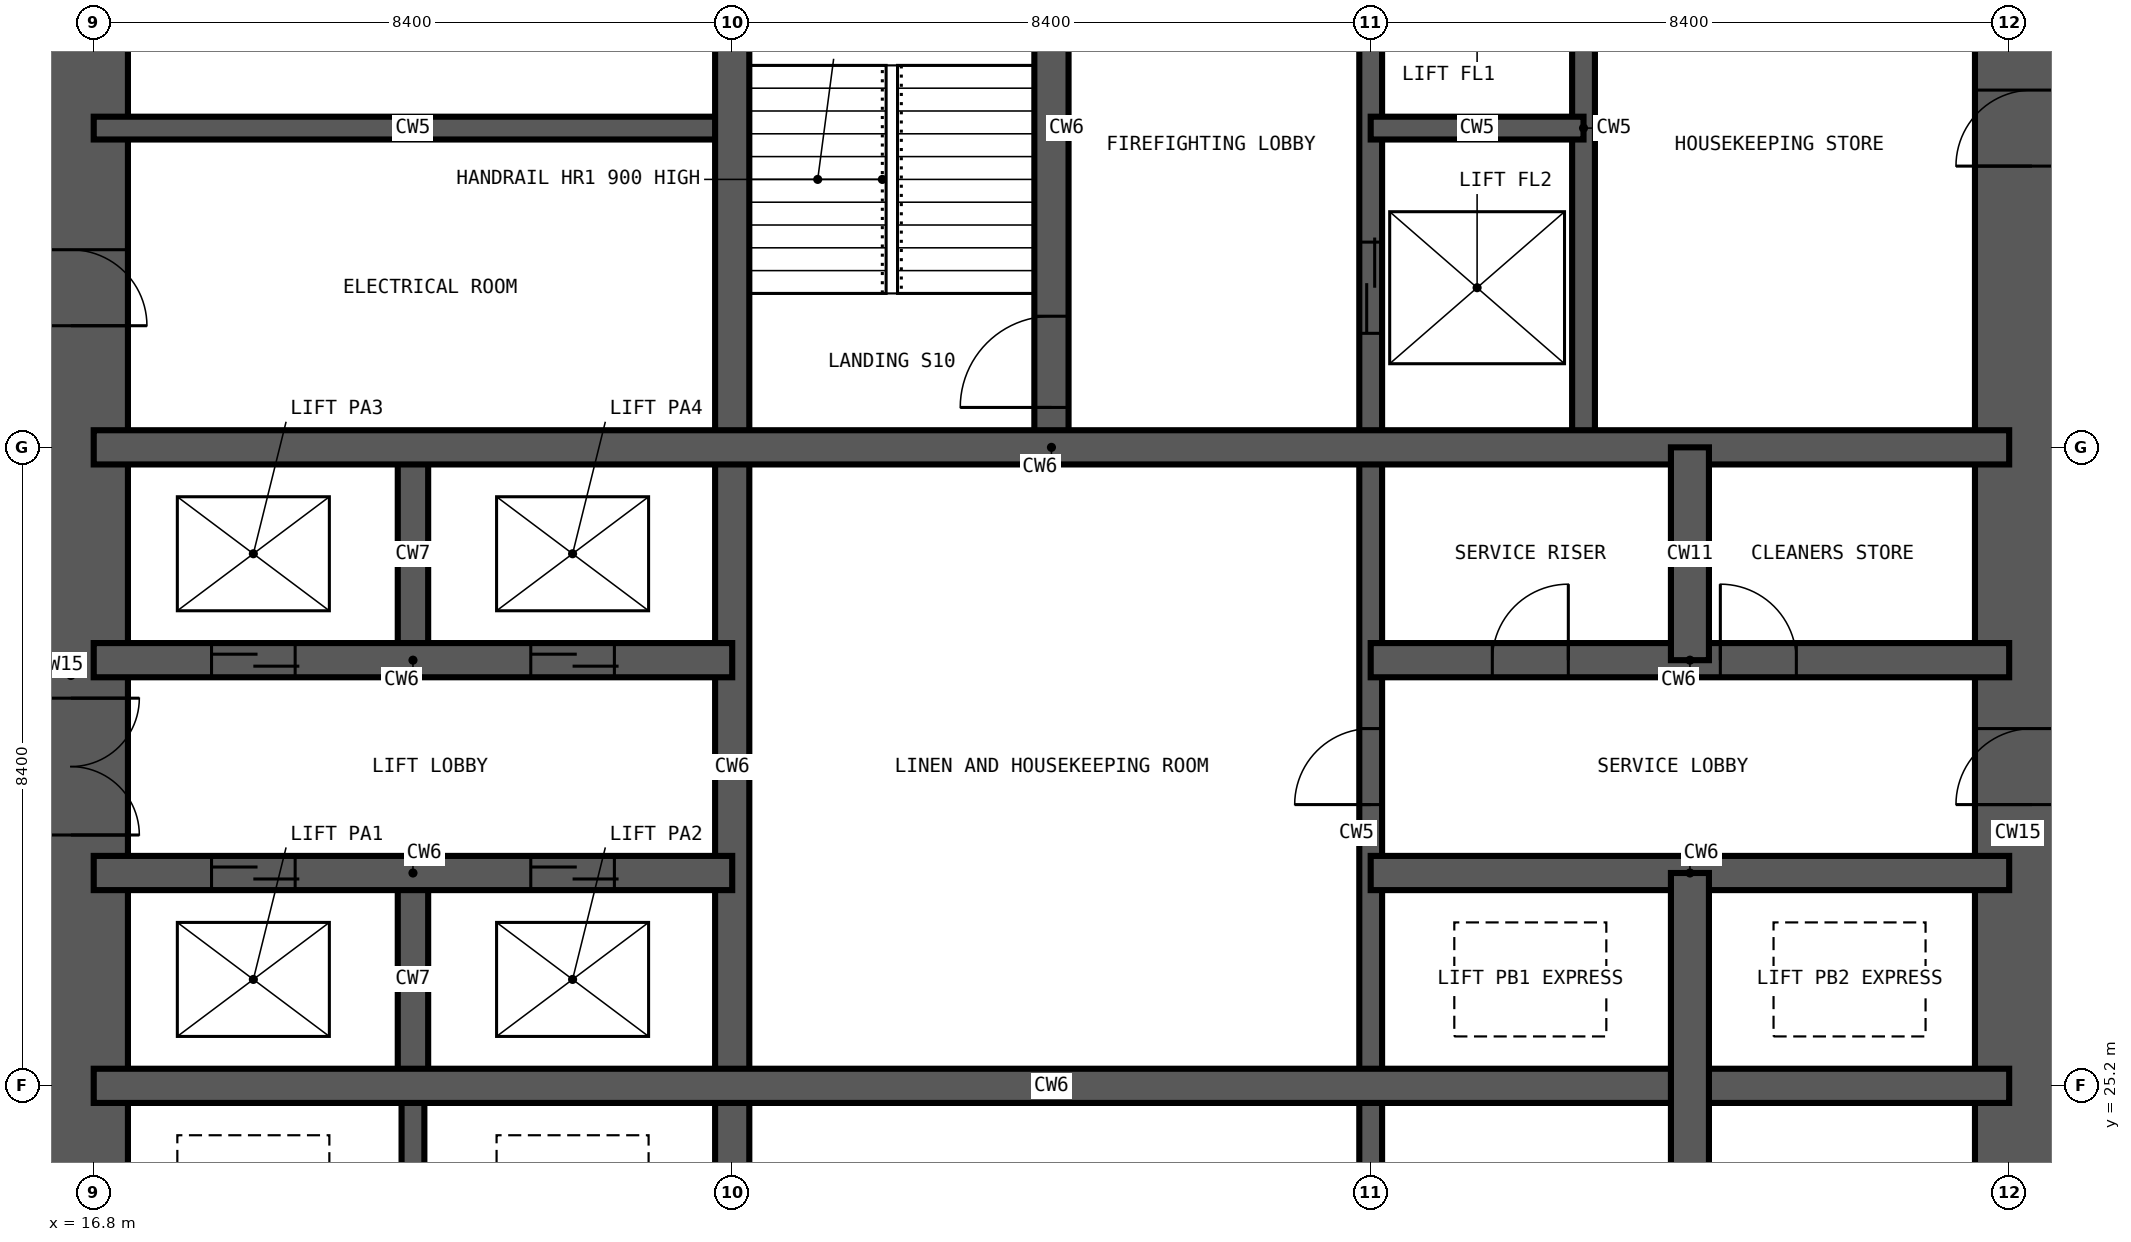
"""IFC4 building model, lengths in metres.
Left out: names, types, materials, properties, quantities, classifications, styles, units other than length and angle.
Written with IfcOpenShell. Run it as: python <this file> out.ifc"""

import sys

from ifc_helpers import new_model, si_unit, direction, frame, frame_2d, origin, place, context, subcontext, project, spatial, rectangle, extrude, element, fill, save


model = new_model("IFC4")
c1 = context("Model", 3, precision=1e-05, world=origin(), true_north=direction((0.0, 1.0)))
c2 = subcontext(c1, "Body", "Model", "MODEL_VIEW")
j1 = project(units=[si_unit("LENGTHUNIT", "METRE"), si_unit("PLANEANGLEUNIT", "RADIAN")], contexts=[c1])
p1 = place(None, origin())
s1 = spatial("IfcSite", under=j1, at=p1, CompositionType="ELEMENT")
p2 = place(p1, origin())
s2 = spatial("IfcBuilding", under=s1, at=p2, CompositionType="ELEMENT")
p3 = place(p2, frame((0.0, 0.0, 52.2)))
s3 = spatial("IfcBuildingStorey", under=s2, at=p3, CompositionType="ELEMENT", Elevation=52.2)
p4 = place(p3, frame((42.3, 17.25, -0.35), z_axis=(0.0, 0.0, 1.0), x_axis=(0.0, 1.0, 0.0)))
e1 = element("IfcWall", 1, at=p4, inside=s3, PredefinedType="SHEAR", context=c2, shape_type="SweptSolid", body=[
    extrude(rectangle(XDim=24.3, YDim=1.5, at=frame_2d((12.15, 0.0))), origin(), (0.0, 0.0, 1.0), 3.6),
])
p5 = place(p4, frame((0.35, 0.0, 0.35)))
e2 = element("IfcOpeningElement", 2, at=p5, cuts=e1, PredefinedType="OPENING", context=c2, shape_type="SweptSolid", body=[
    extrude(rectangle(XDim=1.2, YDim=2.2, at=frame_2d((0.6, 1.1))), frame((0.0, 0.76, 0.0), z_axis=(0.0, -1.0, 0.0), x_axis=(1.0, 0.0, 0.0)), (0.0, 0.0, 1.0), 1.52),
])
p6 = place(p4, frame((11.65, 0.0, 0.35)))
e3 = element("IfcOpeningElement", 3, at=p6, cuts=e1, PredefinedType="OPENING", context=c2, shape_type="SweptSolid", body=[
    extrude(rectangle(XDim=1.0, YDim=2.1, at=frame_2d((0.5, 1.05))), frame((0.0, 0.76, 0.0), z_axis=(0.0, -1.0, 0.0), x_axis=(1.0, 0.0, 0.0)), (0.0, 0.0, 1.0), 1.52),
])
p7 = place(p4, frame((20.05, 0.0, 0.35)))
e4 = element("IfcOpeningElement", 4, at=p7, cuts=e1, PredefinedType="OPENING", context=c2, shape_type="SweptSolid", body=[
    extrude(rectangle(XDim=1.0, YDim=2.1, at=frame_2d((0.5, 1.05))), frame((0.0, 0.76, 0.0), z_axis=(0.0, -1.0, 0.0), x_axis=(1.0, 0.0, 0.0)), (0.0, 0.0, 1.0), 1.52),
])
p8 = place(p3, frame((16.5, 41.55, -0.35), z_axis=(0.0, 0.0, 1.0), x_axis=(0.0, -1.0, 0.0)))
e5 = element("IfcWall", 5, at=p8, inside=s3, PredefinedType="SHEAR", context=c2, shape_type="SweptSolid", body=[
    extrude(rectangle(XDim=24.3, YDim=1.5, at=frame_2d((12.15, 0.0))), origin(), (0.0, 0.0, 1.0), 3.6),
])
p9 = place(p8, frame((11.25, 0.0, 0.35)))
e6 = element("IfcOpeningElement", 6, at=p9, cuts=e5, PredefinedType="OPENING", context=c2, shape_type="SweptSolid", body=[
    extrude(rectangle(XDim=1.8, YDim=2.2, at=frame_2d((0.9, 1.1))), frame((0.0, 0.76, 0.0), z_axis=(0.0, -1.0, 0.0), x_axis=(1.0, 0.0, 0.0)), (0.0, 0.0, 1.0), 1.52),
])
p10 = place(p8, frame((20.05, 0.0, 0.35)))
e7 = element("IfcOpeningElement", 7, at=p10, cuts=e5, PredefinedType="OPENING", context=c2, shape_type="SweptSolid", body=[
    extrude(rectangle(XDim=1.0, YDim=2.1, at=frame_2d((0.5, 1.05))), frame((0.0, 0.76, 0.0), z_axis=(0.0, -1.0, 0.0), x_axis=(1.0, 0.0, 0.0)), (0.0, 0.0, 1.0), 1.52),
])
p11 = place(p8, frame((5.35, 0.0, 0.35)))
e8 = element("IfcOpeningElement", 8, at=p11, cuts=e5, PredefinedType="OPENING", context=c2, shape_type="SweptSolid", body=[
    extrude(rectangle(XDim=1.0, YDim=2.1, at=frame_2d((0.5, 1.05))), frame((0.0, 0.76, 0.0), z_axis=(0.0, -1.0, 0.0), x_axis=(1.0, 0.0, 0.0)), (0.0, 0.0, 1.0), 1.52),
])
p12 = place(p3, frame((21.0, 22.4, -0.35), z_axis=(0.0, 0.0, 1.0), x_axis=(0.0, 1.0, 0.0)))
e9 = element("IfcWall", 9, at=p12, inside=s3, PredefinedType="SHEAR", context=c2, shape_type="SweptSolid", body=[
    extrude(rectangle(XDim=2.8, YDim=0.3, at=frame_2d((1.4, 0.0))), origin(), (0.0, 0.0, 1.0), 3.6),
])
p13 = place(p3, frame((33.6, 16.8, -0.35), z_axis=(0.0, 0.0, 1.0), x_axis=(0.0, 1.0, 0.0)))
e10 = element("IfcWall", 10, at=p13, inside=s3, PredefinedType="SHEAR", context=c2, shape_type="SweptSolid", body=[
    extrude(rectangle(XDim=25.2, YDim=0.3, at=frame_2d((12.6, 0.0))), origin(), (0.0, 0.0, 1.0), 3.6),
])
p14 = place(p13, frame((22.5, 0.0, 0.35)))
e11 = element("IfcOpeningElement", 11, at=p14, cuts=e10, PredefinedType="OPENING", context=c2, shape_type="SweptSolid", body=[
    extrude(rectangle(XDim=1.2, YDim=2.2, at=frame_2d((0.6, 1.1))), frame((0.0, 0.16, 0.0), z_axis=(0.0, -1.0, 0.0), x_axis=(1.0, 0.0, 0.0)), (0.0, 0.0, 1.0), 0.32),
])
p15 = place(p13, frame((18.3, 0.0, 0.35)))
e12 = element("IfcOpeningElement", 12, at=p15, cuts=e10, PredefinedType="OPENING", context=c2, shape_type="SweptSolid", body=[
    extrude(rectangle(XDim=1.2, YDim=2.2, at=frame_2d((0.6, 1.1))), frame((0.0, 0.16, 0.0), z_axis=(0.0, -1.0, 0.0), x_axis=(1.0, 0.0, 0.0)), (0.0, 0.0, 1.0), 0.32),
])
p16 = place(p13, frame((12.1, 0.0, 0.35)))
e13 = element("IfcOpeningElement", 13, at=p16, cuts=e10, PredefinedType="OPENING", context=c2, shape_type="SweptSolid", body=[
    extrude(rectangle(XDim=1.0, YDim=2.1, at=frame_2d((0.5, 1.05))), frame((0.0, 0.16, 0.0), z_axis=(0.0, -1.0, 0.0), x_axis=(1.0, 0.0, 0.0)), (0.0, 0.0, 1.0), 0.32),
])
for number, where, z_axis, x_axis in (
    (14, (36.4, 33.6, -0.35), (0.0, 0.0, 1.0), (0.0, 1.0, 0.0)),
    (15, (16.8, 37.8, -0.35), (0.0, 0.0, 1.0), (1.0, 0.0, 0.0)),
):
    element("IfcWall", number, at=place(p3, frame(where, z_axis=z_axis, x_axis=x_axis)), inside=s3, PredefinedType="SHEAR", context=c2, shape_type="SweptSolid", body=[
        extrude(rectangle(XDim=8.4, YDim=0.3, at=frame_2d((4.2, 0.0))), origin(), (0.0, 0.0, 1.0), 3.6),
    ])
p17 = place(p3, frame((33.6, 37.8, -0.35), z_axis=(0.0, 0.0, 1.0), x_axis=(1.0, 0.0, 0.0)))
e16 = element("IfcWall", 16, at=p17, inside=s3, PredefinedType="SHEAR", context=c2, shape_type="SweptSolid", body=[
    extrude(rectangle(XDim=2.8, YDim=0.3, at=frame_2d((1.4, 0.0))), origin(), (0.0, 0.0, 1.0), 3.6),
])
for number, where, z_axis, x_axis in (
    (17, (21.0, 25.2, -0.35), (0.0, 0.0, 1.0), (0.0, 1.0, 0.0)),
    (18, (21.0, 30.8, -0.35), (0.0, 0.0, 1.0), (0.0, 1.0, 0.0)),
):
    element("IfcWall", number, at=place(p3, frame(where, z_axis=z_axis, x_axis=x_axis)), inside=s3, PredefinedType="SHEAR", context=c2, shape_type="SweptSolid", body=[
        extrude(rectangle(XDim=2.8, YDim=0.4, at=frame_2d((1.4, 0.0))), origin(), (0.0, 0.0, 1.0), 3.6),
    ])
p18 = place(p3, frame((25.2, 16.8, -0.35), z_axis=(0.0, 0.0, 1.0), x_axis=(0.0, 1.0, 0.0)))
e19 = element("IfcWall", 19, at=p18, inside=s3, PredefinedType="SHEAR", context=c2, shape_type="SweptSolid", body=[
    extrude(rectangle(XDim=25.2, YDim=0.45, at=frame_2d((12.6, 0.0))), origin(), (0.0, 0.0, 1.0), 3.6),
])
p19 = place(p3, frame((29.4, 33.6, -0.35), z_axis=(0.0, 0.0, 1.0), x_axis=(0.0, 1.0, 0.0)))
e20 = element("IfcWall", 20, at=p19, inside=s3, PredefinedType="SHEAR", context=c2, shape_type="SweptSolid", body=[
    extrude(rectangle(XDim=8.4, YDim=0.45, at=frame_2d((4.2, 0.0))), origin(), (0.0, 0.0, 1.0), 3.6),
])
p20 = place(p19, frame((0.525, 0.0, 0.35)))
e21 = element("IfcOpeningElement", 21, at=p20, cuts=e20, PredefinedType="OPENING", context=c2, shape_type="SweptSolid", body=[
    extrude(rectangle(XDim=1.2, YDim=2.2, at=frame_2d((0.6, 1.1))), frame((0.0, 0.235, 0.0), z_axis=(0.0, -1.0, 0.0), x_axis=(1.0, 0.0, 0.0)), (0.0, 0.0, 1.0), 0.47),
])
p21 = place(p3, frame((16.8, 25.2, -0.35), z_axis=(0.0, 0.0, 1.0), x_axis=(1.0, 0.0, 0.0)))
e22 = element("IfcWall", 22, at=p21, inside=s3, PredefinedType="SHEAR", context=c2, shape_type="SweptSolid", body=[
    extrude(rectangle(XDim=25.2, YDim=0.45, at=frame_2d((12.6, 0.0))), origin(), (0.0, 0.0, 1.0), 3.6),
])
p22 = place(p3, frame((16.8, 28.0, -0.35), z_axis=(0.0, 0.0, 1.0), x_axis=(1.0, 0.0, 0.0)))
e23 = element("IfcWall", 23, at=p22, inside=s3, PredefinedType="SHEAR", context=c2, shape_type="SweptSolid", body=[
    extrude(rectangle(XDim=8.4, YDim=0.45, at=frame_2d((4.2, 0.0))), origin(), (0.0, 0.0, 1.0), 3.6),
])
p23 = place(p22, frame((1.55, 0.0, 0.35)))
e24 = element("IfcOpeningElement", 24, at=p23, cuts=e23, PredefinedType="OPENING", context=c2, shape_type="SweptSolid", body=[
    extrude(rectangle(XDim=1.1, YDim=2.2, at=frame_2d((0.55, 1.1))), frame((0.0, 0.235, 0.0), z_axis=(0.0, -1.0, 0.0), x_axis=(1.0, 0.0, 0.0)), (0.0, 0.0, 1.0), 0.47),
])
p24 = place(p22, frame((5.75, 0.0, 0.35)))
e25 = element("IfcOpeningElement", 25, at=p24, cuts=e23, PredefinedType="OPENING", context=c2, shape_type="SweptSolid", body=[
    extrude(rectangle(XDim=1.1, YDim=2.2, at=frame_2d((0.55, 1.1))), frame((0.0, 0.235, 0.0), z_axis=(0.0, -1.0, 0.0), x_axis=(1.0, 0.0, 0.0)), (0.0, 0.0, 1.0), 0.47),
])
p25 = place(p3, frame((33.6, 28.0, -0.35), z_axis=(0.0, 0.0, 1.0), x_axis=(1.0, 0.0, 0.0)))
e26 = element("IfcWall", 26, at=p25, inside=s3, PredefinedType="SHEAR", context=c2, shape_type="SweptSolid", body=[
    extrude(rectangle(XDim=8.4, YDim=0.45, at=frame_2d((4.2, 0.0))), origin(), (0.0, 0.0, 1.0), 3.6),
])
p26 = place(p3, frame((16.8, 30.8, -0.35), z_axis=(0.0, 0.0, 1.0), x_axis=(1.0, 0.0, 0.0)))
e27 = element("IfcWall", 27, at=p26, inside=s3, PredefinedType="SHEAR", context=c2, shape_type="SweptSolid", body=[
    extrude(rectangle(XDim=8.4, YDim=0.45, at=frame_2d((4.2, 0.0))), origin(), (0.0, 0.0, 1.0), 3.6),
])
p27 = place(p26, frame((1.55, 0.0, 0.35)))
e28 = element("IfcOpeningElement", 28, at=p27, cuts=e27, PredefinedType="OPENING", context=c2, shape_type="SweptSolid", body=[
    extrude(rectangle(XDim=1.1, YDim=2.2, at=frame_2d((0.55, 1.1))), frame((0.0, 0.235, 0.0), z_axis=(0.0, -1.0, 0.0), x_axis=(1.0, 0.0, 0.0)), (0.0, 0.0, 1.0), 0.47),
])
p28 = place(p26, frame((5.75, 0.0, 0.35)))
e29 = element("IfcOpeningElement", 29, at=p28, cuts=e27, PredefinedType="OPENING", context=c2, shape_type="SweptSolid", body=[
    extrude(rectangle(XDim=1.1, YDim=2.2, at=frame_2d((0.55, 1.1))), frame((0.0, 0.235, 0.0), z_axis=(0.0, -1.0, 0.0), x_axis=(1.0, 0.0, 0.0)), (0.0, 0.0, 1.0), 0.47),
])
p29 = place(p3, frame((33.6, 30.8, -0.35), z_axis=(0.0, 0.0, 1.0), x_axis=(1.0, 0.0, 0.0)))
e30 = element("IfcWall", 30, at=p29, inside=s3, PredefinedType="SHEAR", context=c2, shape_type="SweptSolid", body=[
    extrude(rectangle(XDim=8.4, YDim=0.45, at=frame_2d((4.2, 0.0))), origin(), (0.0, 0.0, 1.0), 3.6),
])
p30 = place(p29, frame((1.6, 0.0, 0.35)))
e31 = element("IfcOpeningElement", 31, at=p30, cuts=e30, PredefinedType="OPENING", context=c2, shape_type="SweptSolid", body=[
    extrude(rectangle(XDim=1.0, YDim=2.1, at=frame_2d((0.5, 1.05))), frame((0.0, 0.235, 0.0), z_axis=(0.0, -1.0, 0.0), x_axis=(1.0, 0.0, 0.0)), (0.0, 0.0, 1.0), 0.47),
])
p31 = place(p29, frame((4.6, 0.0, 0.35)))
e32 = element("IfcOpeningElement", 32, at=p31, cuts=e30, PredefinedType="OPENING", context=c2, shape_type="SweptSolid", body=[
    extrude(rectangle(XDim=1.0, YDim=2.1, at=frame_2d((0.5, 1.05))), frame((0.0, 0.235, 0.0), z_axis=(0.0, -1.0, 0.0), x_axis=(1.0, 0.0, 0.0)), (0.0, 0.0, 1.0), 0.47),
])
p32 = place(p3, frame((16.8, 33.6, -0.35), z_axis=(0.0, 0.0, 1.0), x_axis=(1.0, 0.0, 0.0)))
e33 = element("IfcWall", 33, at=p32, inside=s3, PredefinedType="SHEAR", context=c2, shape_type="SweptSolid", body=[
    extrude(rectangle(XDim=25.2, YDim=0.45, at=frame_2d((12.6, 0.0))), origin(), (0.0, 0.0, 1.0), 3.6),
])
p33 = place(p3, frame((37.8, 16.8, -0.35), z_axis=(0.0, 0.0, 1.0), x_axis=(0.0, 1.0, 0.0)))
e34 = element("IfcWall", 34, at=p33, inside=s3, PredefinedType="SHEAR", context=c2, shape_type="SweptSolid", body=[
    extrude(rectangle(XDim=11.2, YDim=0.5, at=frame_2d((5.6, 0.0))), origin(), (0.0, 0.0, 1.0), 3.6),
])
p34 = place(p3, frame((37.8, 30.8, -0.35), z_axis=(0.0, 0.0, 1.0), x_axis=(0.0, 1.0, 0.0)))
e35 = element("IfcWall", 35, at=p34, inside=s3, PredefinedType="SHEAR", context=c2, shape_type="SweptSolid", body=[
    extrude(rectangle(XDim=2.8, YDim=0.5, at=frame_2d((1.4, 0.0))), origin(), (0.0, 0.0, 1.0), 3.6),
])
p35 = place(p20, origin())
e36 = element("IfcDoor", 36, at=p35, inside=s3, OperationType="SINGLE_SWING_LEFT", PredefinedType="DOOR", context=c2, shape_type="SweptSolid", body=[
    extrude(rectangle(XDim=1.2, YDim=2.2, at=frame_2d((0.6, 1.1))), frame((0.0, 0.025, 0.0), z_axis=(0.0, -1.0, 0.0), x_axis=(1.0, 0.0, 0.0)), (0.0, 0.0, 1.0), 0.05),
])
fill(e21, e36)
p36 = place(p23, origin())
e37 = element("IfcDoor", 37, at=p36, inside=s3, OperationType="DOUBLE_DOOR_SLIDING", PredefinedType="DOOR", context=c2, shape_type="SweptSolid", body=[
    extrude(rectangle(XDim=1.1, YDim=2.2, at=frame_2d((0.55, 1.1))), frame((0.0, 0.025, 0.0), z_axis=(0.0, -1.0, 0.0), x_axis=(1.0, 0.0, 0.0)), (0.0, 0.0, 1.0), 0.05),
])
fill(e24, e37)
p37 = place(p24, origin())
e38 = element("IfcDoor", 38, at=p37, inside=s3, OperationType="DOUBLE_DOOR_SLIDING", PredefinedType="DOOR", context=c2, shape_type="SweptSolid", body=[
    extrude(rectangle(XDim=1.1, YDim=2.2, at=frame_2d((0.55, 1.1))), frame((0.0, 0.025, 0.0), z_axis=(0.0, -1.0, 0.0), x_axis=(1.0, 0.0, 0.0)), (0.0, 0.0, 1.0), 0.05),
])
fill(e25, e38)
p38 = place(p27, origin())
e39 = element("IfcDoor", 39, at=p38, inside=s3, OperationType="DOUBLE_DOOR_SLIDING", PredefinedType="DOOR", context=c2, shape_type="SweptSolid", body=[
    extrude(rectangle(XDim=1.1, YDim=2.2, at=frame_2d((0.55, 1.1))), frame((0.0, 0.025, 0.0), z_axis=(0.0, -1.0, 0.0), x_axis=(1.0, 0.0, 0.0)), (0.0, 0.0, 1.0), 0.05),
])
fill(e28, e39)
p39 = place(p28, origin())
e40 = element("IfcDoor", 40, at=p39, inside=s3, OperationType="DOUBLE_DOOR_SLIDING", PredefinedType="DOOR", context=c2, shape_type="SweptSolid", body=[
    extrude(rectangle(XDim=1.1, YDim=2.2, at=frame_2d((0.55, 1.1))), frame((0.0, 0.025, 0.0), z_axis=(0.0, -1.0, 0.0), x_axis=(1.0, 0.0, 0.0)), (0.0, 0.0, 1.0), 0.05),
])
fill(e29, e40)
p40 = place(p15, origin())
e41 = element("IfcDoor", 41, at=p40, inside=s3, OperationType="DOUBLE_DOOR_SLIDING", PredefinedType="DOOR", context=c2, shape_type="SweptSolid", body=[
    extrude(rectangle(XDim=1.2, YDim=2.2, at=frame_2d((0.6, 1.1))), frame((0.0, 0.025, 0.0), z_axis=(0.0, -1.0, 0.0), x_axis=(1.0, 0.0, 0.0)), (0.0, 0.0, 1.0), 0.05),
])
fill(e12, e41)
p41 = place(p9, origin())
e42 = element("IfcDoor", 42, at=p41, inside=s3, OperationType="DOUBLE_DOOR_DOUBLE_SWING", PredefinedType="DOOR", context=c2, shape_type="SweptSolid", body=[
    extrude(rectangle(XDim=1.8, YDim=2.2, at=frame_2d((0.9, 1.1))), frame((0.0, 0.025, 0.0), z_axis=(0.0, -1.0, 0.0), x_axis=(1.0, 0.0, 0.0)), (0.0, 0.0, 1.0), 0.05),
])
fill(e6, e42)
p42 = place(p11, origin())
e43 = element("IfcDoor", 43, at=p42, inside=s3, OperationType="SINGLE_SWING_RIGHT", PredefinedType="DOOR", context=c2, shape_type="SweptSolid", body=[
    extrude(rectangle(XDim=1.0, YDim=2.1, at=frame_2d((0.5, 1.05))), frame((0.0, 0.025, 0.0), z_axis=(0.0, -1.0, 0.0), x_axis=(1.0, 0.0, 0.0)), (0.0, 0.0, 1.0), 0.05),
])
fill(e8, e43)
p43 = place(p16, origin())
e44 = element("IfcDoor", 44, at=p43, inside=s3, OperationType="SINGLE_SWING_LEFT", PredefinedType="DOOR", context=c2, shape_type="SweptSolid", body=[
    extrude(rectangle(XDim=1.0, YDim=2.1, at=frame_2d((0.5, 1.05))), frame((0.0, 0.025, 0.0), z_axis=(0.0, -1.0, 0.0), x_axis=(1.0, 0.0, 0.0)), (0.0, 0.0, 1.0), 0.05),
])
fill(e13, e44)
p44 = place(p30, origin())
e45 = element("IfcDoor", 45, at=p44, inside=s3, OperationType="SINGLE_SWING_RIGHT", PredefinedType="DOOR", context=c2, shape_type="SweptSolid", body=[
    extrude(rectangle(XDim=1.0, YDim=2.1, at=frame_2d((0.5, 1.05))), frame((0.0, 0.025, 0.0), z_axis=(0.0, -1.0, 0.0), x_axis=(1.0, 0.0, 0.0)), (0.0, 0.0, 1.0), 0.05),
])
fill(e31, e45)
p45 = place(p31, origin())
e46 = element("IfcDoor", 46, at=p45, inside=s3, OperationType="SINGLE_SWING_LEFT", PredefinedType="DOOR", context=c2, shape_type="SweptSolid", body=[
    extrude(rectangle(XDim=1.0, YDim=2.1, at=frame_2d((0.5, 1.05))), frame((0.0, 0.025, 0.0), z_axis=(0.0, -1.0, 0.0), x_axis=(1.0, 0.0, 0.0)), (0.0, 0.0, 1.0), 0.05),
])
fill(e32, e46)
p46 = place(p6, origin())
e47 = element("IfcDoor", 47, at=p46, inside=s3, OperationType="SINGLE_SWING_LEFT", PredefinedType="DOOR", context=c2, shape_type="SweptSolid", body=[
    extrude(rectangle(XDim=1.0, YDim=2.1, at=frame_2d((0.5, 1.05))), frame((0.0, 0.025, 0.0), z_axis=(0.0, -1.0, 0.0), x_axis=(1.0, 0.0, 0.0)), (0.0, 0.0, 1.0), 0.05),
])
fill(e3, e47)
p47 = place(p7, origin())
e48 = element("IfcDoor", 48, at=p47, inside=s3, OperationType="SINGLE_SWING_LEFT", PredefinedType="DOOR", context=c2, shape_type="SweptSolid", body=[
    extrude(rectangle(XDim=1.0, YDim=2.1, at=frame_2d((0.5, 1.05))), frame((0.0, 0.025, 0.0), z_axis=(0.0, -1.0, 0.0), x_axis=(1.0, 0.0, 0.0)), (0.0, 0.0, 1.0), 0.05),
])
fill(e4, e48)
save(model, sys.argv[1])
